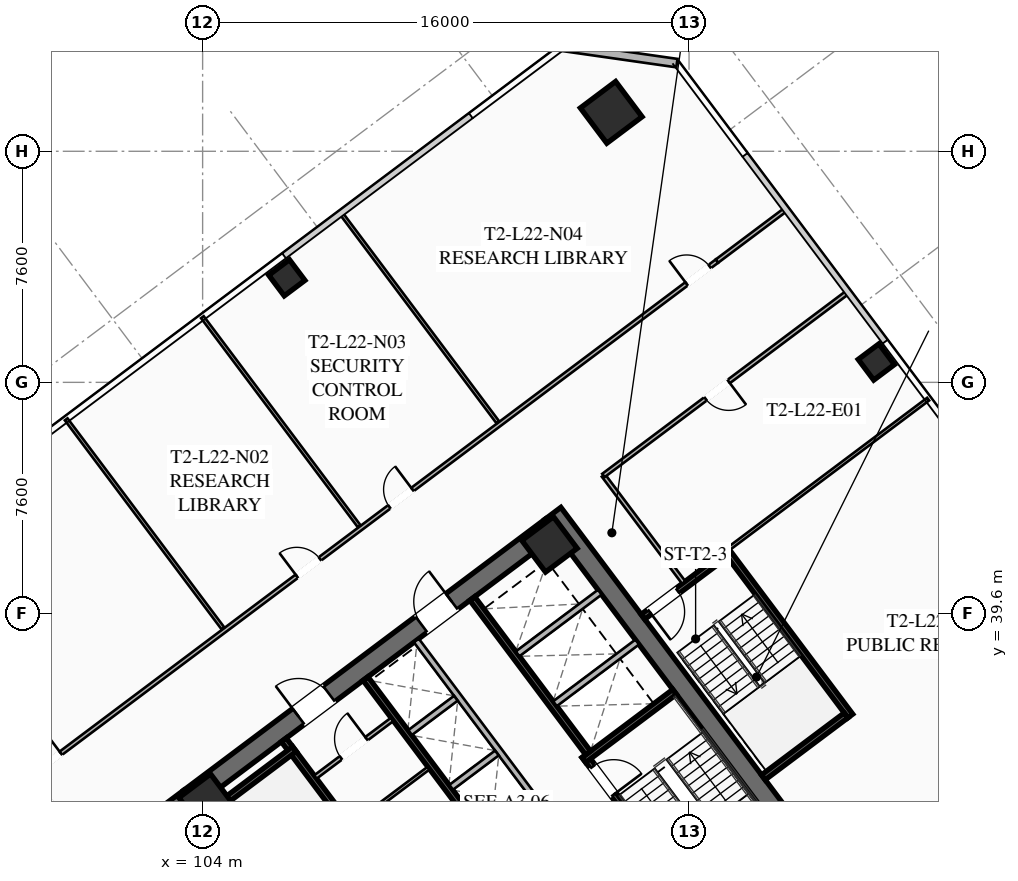
"""IFC4 building model, lengths in metres.
Left out: names, types, materials, properties, quantities, classifications, styles, units other than length and angle.
Written with IfcOpenShell. Run it as: python <this file> out.ifc"""

import sys

from ifc_helpers import new_model, si_unit, direction, frame, frame_2d, origin, origin_2d, place, context, subcontext, project, spatial, rectangle, hollow_rectangle, extrude, element, fill, save


model = new_model("IFC4")
c1 = context("Model", 3, precision=1e-05, world=origin(), true_north=direction((0.0, 1.0)))
c2 = subcontext(c1, "Body", "Model", "MODEL_VIEW")
j1 = project(units=[si_unit("LENGTHUNIT", "METRE"), si_unit("PLANEANGLEUNIT", "RADIAN")], contexts=[c1])
p1 = place(None, origin())
s1 = spatial("IfcSite", under=j1, at=p1, CompositionType="ELEMENT")
p2 = place(p1, origin())
s2 = spatial("IfcBuilding", under=s1, at=p2, CompositionType="ELEMENT")
p3 = place(p2, frame((0.0, 0.0, 84.95)))
s3 = spatial("IfcBuildingStorey", under=s2, at=p3, CompositionType="ELEMENT", Elevation=84.95)
for number, where, z_axis, x_axis in (
    (1, (112.476, 21.107, 0.0), (0.0, 0.0, 1.0), (-0.6, 0.8, 0.0)),
    (2, (115.524, 42.893, 0.0), (0.0, 0.0, 1.0), (0.6, -0.8, 0.0)),
):
    element("IfcWall", number, at=place(p3, frame(where, z_axis=z_axis, x_axis=x_axis)), inside=s3, PredefinedType="SHEAR", context=c2, shape_type="SweptSolid", body=[
        extrude(rectangle(XDim=15.6, YDim=0.65, at=frame_2d((7.8, 0.0))), origin(), (0.0, 0.0, 1.0), 3.55),
    ])
p4 = place(p3, frame((103.571, 33.522, 0.0), z_axis=(0.0, 0.0, 1.0), x_axis=(0.799998028465, 0.600002628705, 0.0)))
e3 = element("IfcWall", 3, at=p4, inside=s3, PredefinedType="SHEAR", context=c2, shape_type="SweptSolid", body=[
    extrude(rectangle(XDim=14.86, YDim=0.65, at=frame_2d((7.43, 0.0))), origin(), (0.0, 0.0, 1.0), 3.55),
])
p5 = place(p4, frame((4.48, 0.0, 0.0)))
e4 = element("IfcOpeningElement", 4, at=p5, cuts=e3, PredefinedType="OPENING", context=c2, shape_type="SweptSolid", body=[
    extrude(rectangle(XDim=1.25, YDim=2.25, at=frame_2d((0.625, 1.125))), frame((0.0, 0.335, 0.0), z_axis=(0.0, -1.0, 0.0), x_axis=(1.0, 0.0, 0.0)), (0.0, 0.0, 1.0), 0.67),
])
p6 = place(p4, frame((9.53, 0.0, 0.0)))
e5 = element("IfcOpeningElement", 5, at=p6, cuts=e3, PredefinedType="OPENING", context=c2, shape_type="SweptSolid", body=[
    extrude(rectangle(XDim=1.25, YDim=2.25, at=frame_2d((0.625, 1.125))), frame((0.0, 0.335, 0.0), z_axis=(0.0, -1.0, 0.0), x_axis=(1.0, 0.0, 0.0)), (0.0, 0.0, 1.0), 0.67),
])
for number, where, z_axis, x_axis in (
    (6, (115.41, 41.87, 0.0), (0.0, 0.0, 1.0), (0.8, 0.6, 0.0)),
    (7, (104.13, 33.41, 0.0), (0.0, 0.0, 1.0), (0.8, 0.6, 0.0)),
):
    element("IfcColumn", number, at=place(p3, frame(where, z_axis=z_axis, x_axis=x_axis)), inside=s3, PredefinedType="COLUMN", context=c2, shape_type="SweptSolid", body=[
        extrude(hollow_rectangle(XDim=1.3, YDim=1.3, WallThickness=0.05, at=origin_2d()), origin(), (0.0, 0.0, 1.0), 3.35),
    ])
p7 = place(p3, frame((117.44, 56.08, 0.0), z_axis=(0.0, 0.0, 1.0), x_axis=(0.799999996291, 0.600000004945, 0.0)))
e8 = element("IfcColumn", 8, at=p7, inside=s3, PredefinedType="COLUMN", context=c2, shape_type="SweptSolid", body=[
    extrude(hollow_rectangle(XDim=1.45, YDim=1.45, WallThickness=0.055, at=origin_2d()), origin(), (0.0, 0.0, 1.0), 3.35),
])
for number, where, z_axis, x_axis in (
    (9, (126.16, 47.87, 0.0), (0.0, 0.0, 1.0), (0.8, 0.6, 0.0)),
    (10, (106.77, 50.64, 0.0), (0.0, 0.0, 1.0), (0.8, 0.6, 0.0)),
):
    element("IfcColumn", number, at=place(p3, frame(where, z_axis=z_axis, x_axis=x_axis)), inside=s3, PredefinedType="COLUMN", context=c2, shape_type="SweptSolid", body=[
        extrude(hollow_rectangle(XDim=0.85, YDim=0.85, WallThickness=0.035, at=origin_2d()), origin(), (0.0, 0.0, 1.0), 3.35),
    ])
p8 = place(p3, frame((115.82, 58.24, 0.0), z_axis=(0.0, 0.0, 1.0), x_axis=(0.989948214866, -0.141430307517, 0.0)))
e11 = element("IfcWall", 11, at=p8, inside=s3, PredefinedType="SOLIDWALL", context=c2, shape_type="SweptSolid", body=[
    extrude(rectangle(XDim=3.818, YDim=0.28, at=frame_2d((1.909, 0.0))), origin(), (0.0, 0.0, 1.0), 3.35),
])
p9 = place(p3, frame((111.44, 29.08, 0.0), z_axis=(0.0, 0.0, 1.0), x_axis=(-0.600009827119, 0.799992629566, 0.0)))
e12 = element("IfcWall", 12, at=p9, inside=s3, PredefinedType="SHEAR", context=c2, shape_type="SweptSolid", body=[
    extrude(rectangle(XDim=7.95, YDim=0.2, at=frame_2d((3.975, 0.0))), origin(), (0.0, 0.0, 1.0), 3.35),
])
p10 = place(p9, frame((0.45, 0.0, 0.0)))
e13 = element("IfcOpeningElement", 13, at=p10, cuts=e12, PredefinedType="OPENING", context=c2, shape_type="SweptSolid", body=[
    extrude(rectangle(XDim=1.15, YDim=2.2, at=frame_2d((0.575, 1.1))), frame((0.0, 0.11, 0.0), z_axis=(0.0, -1.0, 0.0), x_axis=(1.0, 0.0, 0.0)), (0.0, 0.0, 1.0), 0.22),
])
p11 = place(p3, frame((104.036, 32.902, 0.0), z_axis=(0.0, 0.0, 1.0), x_axis=(0.800039270442, 0.59994763584, 0.0)))
e14 = element("IfcWall", 14, at=p11, inside=s3, PredefinedType="SHEAR", context=c2, shape_type="SweptSolid", body=[
    extrude(rectangle(XDim=3.73, YDim=0.2, at=frame_2d((1.865, 0.0))), origin(), (0.0, 0.0, 1.0), 3.35),
])
p12 = place(p3, frame((116.56, 34.92, 0.0), z_axis=(0.0, 0.0, 1.0), x_axis=(0.600009827119, -0.799992629566, 0.0)))
e15 = element("IfcWall", 15, at=p12, inside=s3, PredefinedType="SHEAR", context=c2, shape_type="SweptSolid", body=[
    extrude(rectangle(XDim=7.95, YDim=0.2, at=frame_2d((3.975, 0.0))), origin(), (0.0, 0.0, 1.0), 3.35),
])
p13 = place(p12, frame((0.45, 0.0, 0.0)))
e16 = element("IfcOpeningElement", 16, at=p13, cuts=e15, PredefinedType="OPENING", context=c2, shape_type="SweptSolid", body=[
    extrude(rectangle(XDim=1.15, YDim=2.2, at=frame_2d((0.575, 1.1))), frame((0.0, 0.11, 0.0), z_axis=(0.0, -1.0, 0.0), x_axis=(1.0, 0.0, 0.0)), (0.0, 0.0, 1.0), 0.22),
])
p14 = place(p3, frame((116.54, 34.78, 0.0), z_axis=(0.0, 0.0, 1.0), x_axis=(0.799984290658, 0.600020945218, 0.0)))
e17 = element("IfcWall", 17, at=p14, inside=s3, PredefinedType="SHEAR", context=c2, shape_type="SweptSolid", body=[
    extrude(rectangle(XDim=3.73, YDim=0.2, at=frame_2d((1.865, 0.0))), origin(), (0.0, 0.0, 1.0), 3.35),
])
p15 = place(p3, frame((117.938, 26.016, 0.0), z_axis=(0.0, 0.0, 1.0), x_axis=(-0.600005463273, 0.799995902516, 0.0)))
e18 = element("IfcWall", 18, at=p15, inside=s3, PredefinedType="SHEAR", context=c2, shape_type="SweptSolid", body=[
    extrude(rectangle(XDim=14.3, YDim=0.2, at=frame_2d((7.15, 0.0))), origin(), (0.0, 0.0, 1.0), 3.35),
])
p16 = place(p3, frame((112.87, 40.09, 0.0), z_axis=(0.0, 0.0, 1.0), x_axis=(0.599975393228, -0.800018454488, 0.0)))
e19 = element("IfcWall", 19, at=p16, inside=s3, PredefinedType="SHEAR", context=c2, shape_type="SweptSolid", body=[
    extrude(rectangle(XDim=6.35, YDim=0.2, at=frame_2d((3.175, 0.0))), origin(), (0.0, 0.0, 1.0), 3.35),
])
for number, where, z_axis, x_axis in (
    (20, (115.59, 36.63, 0.0), (0.0, 0.0, 1.0), (0.8, 0.6, 0.0)),
    (21, (114.36, 38.27, 0.0), (0.0, 0.0, 1.0), (0.8, 0.6, 0.0)),
):
    element("IfcWall", number, at=place(p3, frame(where, z_axis=z_axis, x_axis=x_axis)), inside=s3, PredefinedType="SOLIDWALL", context=c2, shape_type="SweptSolid", body=[
        extrude(rectangle(XDim=3.38, YDim=0.2, at=frame_2d((1.69, 0.0))), origin(), (0.0, 0.0, 1.0), 3.35),
    ])
p17 = place(p3, frame((107.71, 34.22, 0.0), z_axis=(0.0, 0.0, 1.0), x_axis=(0.799981399002, 0.60002480053, 0.0)))
e22 = element("IfcWall", 22, at=p17, inside=s3, PredefinedType="PARTITIONING", context=c2, shape_type="SweptSolid", body=[
    extrude(rectangle(XDim=3.15, YDim=0.135, at=frame_2d((1.575, 0.0))), origin(), (0.0, 0.0, 1.0), 2.703),
])
p18 = place(p17, frame((1.05, 0.0, 0.0)))
e23 = element("IfcOpeningElement", 23, at=p18, cuts=e22, PredefinedType="OPENING", context=c2, shape_type="SweptSolid", body=[
    extrude(rectangle(XDim=1.05, YDim=2.2, at=frame_2d((0.525, 1.1))), frame((0.0, 0.077, 0.0), z_axis=(0.0, -1.0, 0.0), x_axis=(1.0, 0.0, 0.0)), (0.0, 0.0, 1.0), 0.155),
])
p19 = place(p3, frame((108.91, 32.62, 0.0), z_axis=(0.0, 0.0, 1.0), x_axis=(0.800018601094, 0.59997519774, 0.0)))
e24 = element("IfcWall", 24, at=p19, inside=s3, PredefinedType="PARTITIONING", context=c2, shape_type="SweptSolid", body=[
    extrude(rectangle(XDim=3.15, YDim=0.11, at=frame_2d((1.575, 0.0))), origin(), (0.0, 0.0, 1.0), 2.703),
])
p20 = place(p3, frame((115.11, 33.27, 0.0), z_axis=(0.0, 0.0, 1.0), x_axis=(-0.600011488909, 0.79999138319, 0.0)))
e25 = element("IfcWall", 25, at=p20, inside=s3, PredefinedType="SOLIDWALL", context=c2, shape_type="SweptSolid", body=[
    extrude(rectangle(XDim=6.8, YDim=0.2, at=frame_2d((3.4, 0.0))), origin(), (0.0, 0.0, 1.0), 3.35),
])
p21 = place(p3, frame((112.176, 33.882, 0.0), z_axis=(0.0, 0.0, 1.0), x_axis=(0.8, 0.6, 0.0)))
e26 = element("IfcWall", 26, at=p21, inside=s3, PredefinedType="SOLIDWALL", context=c2, shape_type="SweptSolid", body=[
    extrude(rectangle(XDim=1.88, YDim=0.2, at=frame_2d((0.94, 0.0))), origin(), (0.0, 0.0, 1.0), 3.35),
])
p22 = place(p3, frame((110.826, 35.682, 0.0), z_axis=(0.0, 0.0, 1.0), x_axis=(0.799984418148, 0.600020775241, 0.0)))
e27 = element("IfcWall", 27, at=p22, inside=s3, PredefinedType="SOLIDWALL", context=c2, shape_type="SweptSolid", body=[
    extrude(rectangle(XDim=1.88, YDim=0.2, at=frame_2d((0.94, 0.0))), origin(), (0.0, 0.0, 1.0), 3.35),
])
p23 = place(p3, frame((125.304, 36.228, 0.0), z_axis=(0.0, 0.0, 1.0), x_axis=(-0.59998851072, 0.800008616831, 0.0)))
e28 = element("IfcWall", 28, at=p23, inside=s3, PredefinedType="SHEAR", context=c2, shape_type="SweptSolid", body=[
    extrude(rectangle(XDim=6.8, YDim=0.2, at=frame_2d((3.4, 0.0))), origin(), (0.0, 0.0, 1.0), 3.35),
])
p24 = place(p3, frame((121.204, 41.528, 0.0), z_axis=(0.0, 0.0, 1.0), x_axis=(-0.800017232136, -0.599977023131, 0.0)))
e29 = element("IfcWall", 29, at=p24, inside=s3, PredefinedType="SHEAR", context=c2, shape_type="SweptSolid", body=[
    extrude(rectangle(XDim=3.4, YDim=0.2, at=frame_2d((1.7, 0.0))), origin(), (0.0, 0.0, 1.0), 3.35),
])
p25 = place(p24, frame((1.975, 0.0, 0.0)))
e30 = element("IfcOpeningElement", 30, at=p25, cuts=e29, PredefinedType="OPENING", context=c2, shape_type="SweptSolid", body=[
    extrude(rectangle(XDim=1.15, YDim=2.2, at=frame_2d((0.575, 1.1))), frame((0.0, 0.11, 0.0), z_axis=(0.0, -1.0, 0.0), x_axis=(1.0, 0.0, 0.0)), (0.0, 0.0, 1.0), 0.22),
])
p26 = place(p3, frame((122.444, 34.208, 0.0), z_axis=(0.0, 0.0, 1.0), x_axis=(0.79999138319, 0.600011488909, 0.0)))
e31 = element("IfcWall", 31, at=p26, inside=s3, PredefinedType="SHEAR", context=c2, shape_type="SweptSolid", body=[
    extrude(rectangle(XDim=3.4, YDim=0.2, at=frame_2d((1.7, 0.0))), origin(), (0.0, 0.0, 1.0), 3.35),
])
p27 = place(p3, frame((119.824, 40.618, 0.0), z_axis=(0.0, 0.0, 1.0), x_axis=(-0.599982243973, 0.800013316712, 0.0)))
e32 = element("IfcWall", 32, at=p27, inside=s3, PredefinedType="PARTITIONING", context=c2, shape_type="SweptSolid", body=[
    extrude(rectangle(XDim=4.4, YDim=0.135, at=frame_2d((2.2, 0.0))), origin(), (0.0, 0.0, 1.0), 2.703),
])
p28 = place(p3, frame((98.336, 34.252, 0.0), z_axis=(0.0, 0.0, 1.0), x_axis=(0.8, 0.6, 0.0)))
e33 = element("IfcWall", 33, at=p28, inside=s3, PredefinedType="PARTITIONING", context=c2, shape_type="SweptSolid", body=[
    extrude(rectangle(XDim=28.23, YDim=0.135, at=frame_2d((14.115, 0.0))), origin(), (0.0, 0.0, 1.0), 2.703),
])
p29 = place(p28, frame((0.3, 0.0, 0.0)))
e34 = element("IfcOpeningElement", 34, at=p29, cuts=e33, PredefinedType="OPENING", context=c2, shape_type="SweptSolid", body=[
    extrude(rectangle(XDim=0.95, YDim=2.05, at=frame_2d((0.475, 1.025))), frame((0.0, 0.077, 0.0), z_axis=(0.0, -1.0, 0.0), x_axis=(1.0, 0.0, 0.0)), (0.0, 0.0, 1.0), 0.155),
])
p30 = place(p28, frame((10.953, 0.0, 0.0)))
e35 = element("IfcOpeningElement", 35, at=p30, cuts=e33, PredefinedType="OPENING", context=c2, shape_type="SweptSolid", body=[
    extrude(rectangle(XDim=0.95, YDim=2.05, at=frame_2d((0.475, 1.025))), frame((0.0, 0.077, 0.0), z_axis=(0.0, -1.0, 0.0), x_axis=(1.0, 0.0, 0.0)), (0.0, 0.0, 1.0), 0.155),
])
p31 = place(p28, frame((14.758, 0.0, 0.0)))
e36 = element("IfcOpeningElement", 36, at=p31, cuts=e33, PredefinedType="OPENING", context=c2, shape_type="SweptSolid", body=[
    extrude(rectangle(XDim=0.95, YDim=2.05, at=frame_2d((0.475, 1.025))), frame((0.0, 0.077, 0.0), z_axis=(0.0, -1.0, 0.0), x_axis=(1.0, 0.0, 0.0)), (0.0, 0.0, 1.0), 0.155),
])
p32 = place(p28, frame((26.98, 0.0, 0.0)))
e37 = element("IfcOpeningElement", 37, at=p32, cuts=e33, PredefinedType="OPENING", context=c2, shape_type="SweptSolid", body=[
    extrude(rectangle(XDim=0.95, YDim=2.05, at=frame_2d((0.475, 1.025))), frame((0.0, 0.077, 0.0), z_axis=(0.0, -1.0, 0.0), x_axis=(1.0, 0.0, 0.0)), (0.0, 0.0, 1.0), 0.155),
])
p33 = place(p3, frame((120.92, 51.19, 0.0), z_axis=(0.0, 0.0, 1.0), x_axis=(0.8000207031, 0.599972394874, 0.0)))
e38 = element("IfcWall", 38, at=p33, inside=s3, PredefinedType="PARTITIONING", context=c2, shape_type="SweptSolid", body=[
    extrude(rectangle(XDim=2.83, YDim=0.135, at=frame_2d((1.415, 0.0))), origin(), (0.0, 0.0, 1.0), 2.703),
])
for number, where, z_axis, x_axis in (
    (39, (104.672, 39.104, 0.0), (0.0, 0.0, 1.0), (-0.6, 0.8, 0.0)),
    (40, (109.152, 42.464, 0.0), (0.0, 0.0, 1.0), (-0.6, 0.8, 0.0)),
):
    element("IfcWall", number, at=place(p3, frame(where, z_axis=z_axis, x_axis=x_axis)), inside=s3, PredefinedType="PARTITIONING", context=c2, shape_type="SweptSolid", body=[
        extrude(rectangle(XDim=8.6, YDim=0.11, at=frame_2d((4.3, 0.0))), origin(), (0.0, 0.0, 1.0), 2.703),
    ])
p34 = place(p3, frame((113.712, 45.884, 0.0), z_axis=(0.0, 0.0, 1.0), x_axis=(-0.6, 0.8, 0.0)))
e41 = element("IfcWall", 41, at=p34, inside=s3, PredefinedType="PARTITIONING", context=c2, shape_type="SweptSolid", body=[
    extrude(rectangle(XDim=8.6, YDim=0.11, at=frame_2d((4.3, 0.0))), origin(), (0.0, 0.0, 1.0), 2.703),
])
p35 = place(p3, frame((134.18, 33.51, 0.0), z_axis=(0.0, 0.0, 1.0), x_axis=(-0.8, -0.6, 0.0)))
e42 = element("IfcWall", 42, at=p35, inside=s3, PredefinedType="PARTITIONING", context=c2, shape_type="SweptSolid", body=[
    extrude(rectangle(XDim=28.23, YDim=0.135, at=frame_2d((14.115, 0.0))), origin(), (0.0, 0.0, 1.0), 2.703),
])
p36 = place(p35, frame((26.9, 0.0, 0.0)))
e43 = element("IfcOpeningElement", 43, at=p36, cuts=e42, PredefinedType="OPENING", context=c2, shape_type="SweptSolid", body=[
    extrude(rectangle(XDim=0.95, YDim=2.05, at=frame_2d((0.475, 1.025))), frame((0.0, 0.077, 0.0), z_axis=(0.0, -1.0, 0.0), x_axis=(1.0, 0.0, 0.0)), (0.0, 0.0, 1.0), 0.155),
])
p37 = place(p35, frame((16.368, 0.0, 0.0)))
e44 = element("IfcOpeningElement", 44, at=p37, cuts=e42, PredefinedType="OPENING", context=c2, shape_type="SweptSolid", body=[
    extrude(rectangle(XDim=0.95, YDim=2.05, at=frame_2d((0.475, 1.025))), frame((0.0, 0.077, 0.0), z_axis=(0.0, -1.0, 0.0), x_axis=(1.0, 0.0, 0.0)), (0.0, 0.0, 1.0), 0.155),
])
p38 = place(p35, frame((0.38, 0.0, 0.0)))
e45 = element("IfcOpeningElement", 45, at=p38, cuts=e42, PredefinedType="OPENING", context=c2, shape_type="SweptSolid", body=[
    extrude(rectangle(XDim=0.95, YDim=2.05, at=frame_2d((0.475, 1.025))), frame((0.0, 0.077, 0.0), z_axis=(0.0, -1.0, 0.0), x_axis=(1.0, 0.0, 0.0)), (0.0, 0.0, 1.0), 0.155),
])
p39 = place(p3, frame((125.224, 50.168, 0.0), z_axis=(0.0, 0.0, 1.0), x_axis=(-0.8, -0.6, 0.0)))
e46 = element("IfcWall", 46, at=p39, inside=s3, PredefinedType="PARTITIONING", context=c2, shape_type="SweptSolid", body=[
    extrude(rectangle(XDim=10.05, YDim=0.135, at=frame_2d((5.025, 0.0))), origin(), (0.0, 0.0, 1.0), 2.703),
])
p40 = place(p39, frame((4.9, 0.0, 0.0)))
e47 = element("IfcOpeningElement", 47, at=p40, cuts=e46, PredefinedType="OPENING", context=c2, shape_type="SweptSolid", body=[
    extrude(rectangle(XDim=0.95, YDim=2.05, at=frame_2d((0.475, 1.025))), frame((0.0, 0.077, 0.0), z_axis=(0.0, -1.0, 0.0), x_axis=(1.0, 0.0, 0.0)), (0.0, 0.0, 1.0), 0.155),
])
p41 = place(p3, frame((125.208, 30.656, 0.0), z_axis=(0.0, 0.0, 1.0), x_axis=(0.8, 0.6, 0.0)))
e48 = element("IfcWall", 48, at=p41, inside=s3, PredefinedType="PARTITIONING", context=c2, shape_type="SweptSolid", body=[
    extrude(rectangle(XDim=11.72, YDim=0.135, at=frame_2d((5.86, 0.0))), origin(), (0.0, 0.0, 1.0), 2.703),
])
p42 = place(p41, frame((2.045, 0.0, 0.0)))
e49 = element("IfcOpeningElement", 49, at=p42, cuts=e48, PredefinedType="OPENING", context=c2, shape_type="SweptSolid", body=[
    extrude(rectangle(XDim=0.95, YDim=2.05, at=frame_2d((0.475, 1.025))), frame((0.0, 0.077, 0.0), z_axis=(0.0, -1.0, 0.0), x_axis=(1.0, 0.0, 0.0)), (0.0, 0.0, 1.0), 0.155),
])
p43 = place(p3, frame((127.864, 46.648, 0.0), z_axis=(0.0, 0.0, 1.0), x_axis=(-0.800007145523, -0.599990472518, 0.0)))
e50 = element("IfcWall", 50, at=p43, inside=s3, PredefinedType="PARTITIONING", context=c2, shape_type="SweptSolid", body=[
    extrude(rectangle(XDim=8.2, YDim=0.11, at=frame_2d((4.1, 0.0))), origin(), (0.0, 0.0, 1.0), 2.703),
])
p44 = place(p3, frame((111.548, 16.636, 0.0), z_axis=(0.0, 0.0, 1.0), x_axis=(-0.600001780419, 0.799998664682, 0.0)))
e51 = element("IfcWall", 51, at=p44, inside=s3, PredefinedType="PARTITIONING", context=c2, shape_type="SweptSolid", body=[
    extrude(rectangle(XDim=21.94, YDim=0.135, at=frame_2d((10.97, 0.0))), origin(), (0.0, 0.0, 1.0), 2.703),
])
p45 = place(p44, frame((20.69, 0.0, 0.0)))
e52 = element("IfcOpeningElement", 52, at=p45, cuts=e51, PredefinedType="OPENING", context=c2, shape_type="SweptSolid", body=[
    extrude(rectangle(XDim=0.95, YDim=2.05, at=frame_2d((0.475, 1.025))), frame((0.0, 0.077, 0.0), z_axis=(0.0, -1.0, 0.0), x_axis=(1.0, 0.0, 0.0)), (0.0, 0.0, 1.0), 0.155),
])
p46 = place(p5, origin())
e53 = element("IfcDoor", 53, at=p46, inside=s3, OperationType="SINGLE_SWING_LEFT", PredefinedType="DOOR", context=c2, shape_type="SweptSolid", body=[
    extrude(rectangle(XDim=1.25, YDim=2.25, at=frame_2d((0.625, 1.125))), frame((0.0, 0.025, 0.0), z_axis=(0.0, -1.0, 0.0), x_axis=(1.0, 0.0, 0.0)), (0.0, 0.0, 1.0), 0.05),
])
fill(e4, e53)
p47 = place(p6, origin())
e54 = element("IfcDoor", 54, at=p47, inside=s3, OperationType="SINGLE_SWING_RIGHT", PredefinedType="DOOR", context=c2, shape_type="SweptSolid", body=[
    extrude(rectangle(XDim=1.25, YDim=2.25, at=frame_2d((0.625, 1.125))), frame((0.0, 0.025, 0.0), z_axis=(0.0, -1.0, 0.0), x_axis=(1.0, 0.0, 0.0)), (0.0, 0.0, 1.0), 0.05),
])
fill(e5, e54)
p48 = place(p13, origin())
e55 = element("IfcDoor", 55, at=p48, inside=s3, OperationType="SINGLE_SWING_RIGHT", PredefinedType="DOOR", context=c2, shape_type="SweptSolid", body=[
    extrude(rectangle(XDim=1.15, YDim=2.2, at=frame_2d((0.575, 1.1))), frame((0.0, 0.025, 0.0), z_axis=(0.0, -1.0, 0.0), x_axis=(1.0, 0.0, 0.0)), (0.0, 0.0, 1.0), 0.05),
])
fill(e16, e55)
p49 = place(p18, origin())
e56 = element("IfcDoor", 56, at=p49, inside=s3, OperationType="SINGLE_SWING_RIGHT", PredefinedType="DOOR", context=c2, shape_type="SweptSolid", body=[
    extrude(rectangle(XDim=1.05, YDim=2.2, at=frame_2d((0.525, 1.1))), frame((0.0, 0.025, 0.0), z_axis=(0.0, -1.0, 0.0), x_axis=(1.0, 0.0, 0.0)), (0.0, 0.0, 1.0), 0.05),
])
fill(e23, e56)
p50 = place(p25, origin())
e57 = element("IfcDoor", 57, at=p50, inside=s3, OperationType="SINGLE_SWING_RIGHT", PredefinedType="DOOR", context=c2, shape_type="SweptSolid", body=[
    extrude(rectangle(XDim=1.15, YDim=2.2, at=frame_2d((0.575, 1.1))), frame((0.0, 0.025, 0.0), z_axis=(0.0, -1.0, 0.0), x_axis=(1.0, 0.0, 0.0)), (0.0, 0.0, 1.0), 0.05),
])
fill(e30, e57)
p51 = place(p29, origin())
e58 = element("IfcDoor", 58, at=p51, inside=s3, OperationType="SINGLE_SWING_RIGHT", PredefinedType="DOOR", context=c2, shape_type="SweptSolid", body=[
    extrude(rectangle(XDim=0.95, YDim=2.05, at=frame_2d((0.475, 1.025))), frame((0.0, 0.025, 0.0), z_axis=(0.0, -1.0, 0.0), x_axis=(1.0, 0.0, 0.0)), (0.0, 0.0, 1.0), 0.05),
])
fill(e34, e58)
p52 = place(p30, origin())
e59 = element("IfcDoor", 59, at=p52, inside=s3, OperationType="SINGLE_SWING_LEFT", PredefinedType="DOOR", context=c2, shape_type="SweptSolid", body=[
    extrude(rectangle(XDim=0.95, YDim=2.05, at=frame_2d((0.475, 1.025))), frame((0.0, 0.025, 0.0), z_axis=(0.0, -1.0, 0.0), x_axis=(1.0, 0.0, 0.0)), (0.0, 0.0, 1.0), 0.05),
])
fill(e35, e59)
p53 = place(p31, origin())
e60 = element("IfcDoor", 60, at=p53, inside=s3, OperationType="SINGLE_SWING_RIGHT", PredefinedType="DOOR", context=c2, shape_type="SweptSolid", body=[
    extrude(rectangle(XDim=0.95, YDim=2.05, at=frame_2d((0.475, 1.025))), frame((0.0, 0.025, 0.0), z_axis=(0.0, -1.0, 0.0), x_axis=(1.0, 0.0, 0.0)), (0.0, 0.0, 1.0), 0.05),
])
fill(e36, e60)
p54 = place(p32, origin())
e61 = element("IfcDoor", 61, at=p54, inside=s3, OperationType="SINGLE_SWING_LEFT", PredefinedType="DOOR", context=c2, shape_type="SweptSolid", body=[
    extrude(rectangle(XDim=0.95, YDim=2.05, at=frame_2d((0.475, 1.025))), frame((0.0, 0.025, 0.0), z_axis=(0.0, -1.0, 0.0), x_axis=(1.0, 0.0, 0.0)), (0.0, 0.0, 1.0), 0.05),
])
fill(e37, e61)
p55 = place(p40, origin())
e62 = element("IfcDoor", 62, at=p55, inside=s3, OperationType="SINGLE_SWING_LEFT", PredefinedType="DOOR", context=c2, shape_type="SweptSolid", body=[
    extrude(rectangle(XDim=0.95, YDim=2.05, at=frame_2d((0.475, 1.025))), frame((0.0, 0.025, 0.0), z_axis=(0.0, -1.0, 0.0), x_axis=(1.0, 0.0, 0.0)), (0.0, 0.0, 1.0), 0.05),
])
fill(e47, e62)
p56 = place(p45, origin())
e63 = element("IfcDoor", 63, at=p56, inside=s3, OperationType="SINGLE_SWING_LEFT", PredefinedType="DOOR", context=c2, shape_type="SweptSolid", body=[
    extrude(rectangle(XDim=0.95, YDim=2.05, at=frame_2d((0.475, 1.025))), frame((0.0, 0.025, 0.0), z_axis=(0.0, -1.0, 0.0), x_axis=(1.0, 0.0, 0.0)), (0.0, 0.0, 1.0), 0.05),
])
fill(e52, e63)
save(model, sys.argv[1])
